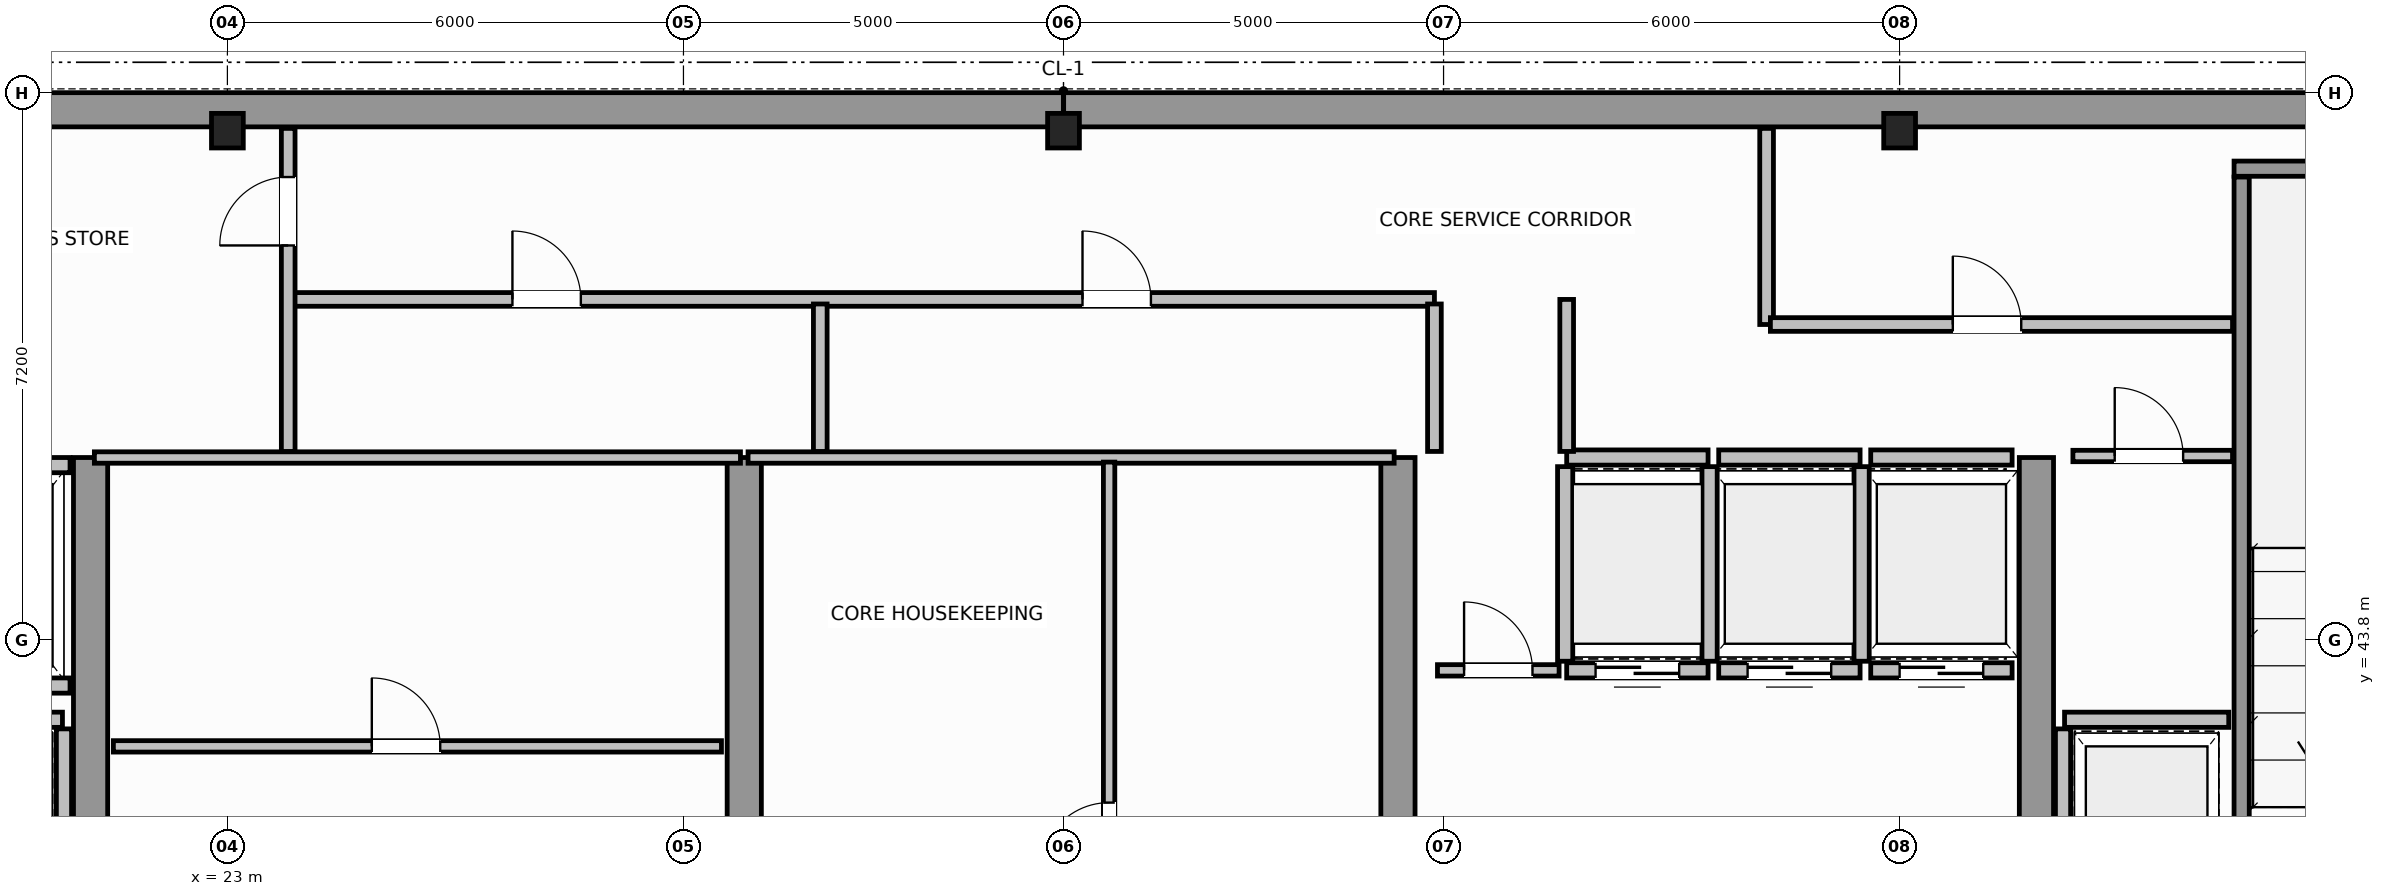
"""IFC4 building model, lengths in metres.
Left out: names, types, materials, properties, quantities, classifications, styles, units other than length and angle.
Written with IfcOpenShell. Run it as: python <this file> out.ifc"""

import sys

from ifc_helpers import new_model, si_unit, direction, frame, frame_2d, origin, origin_2d, place, context, subcontext, project, spatial, rectangle, i_section, extrude, source, transform, mapped, element, fill, save


model = new_model("IFC4")
c1 = context("Model", 3, precision=1e-05, world=origin(), true_north=direction((0.0, 1.0)))
c2 = subcontext(c1, "Body", "Model", "MODEL_VIEW")
j1 = project(units=[si_unit("LENGTHUNIT", "METRE"), si_unit("PLANEANGLEUNIT", "RADIAN")], contexts=[c1])
p1 = place(None, origin())
s1 = spatial("IfcSite", under=j1, at=p1, CompositionType="ELEMENT")
p2 = place(p1, origin())
s2 = spatial("IfcBuilding", under=s1, at=p2, CompositionType="ELEMENT")
p3 = place(p2, frame((0.0, 0.0, 246.0)))
s3 = spatial("IfcBuildingStorey", under=s2, at=p3, CompositionType="ELEMENT", Elevation=246.0)
m1 = source(origin(), c2, "Body", "SweptSolid", [
    extrude(i_section(OverallWidth=0.418, OverallDepth=0.455, WebThickness=0.042, FlangeThickness=0.058, FilletRadius=0.015, at=origin_2d()), origin(), (0.0, 0.0, 1.0), 3.8),
])
for number, where, z_axis, x_axis in (
    (1, (23.0, 50.5, 0.0), (0.0, 0.0, 1.0), (1.0, 0.0, 0.0)),
    (2, (34.0, 50.5, 0.0), (0.0, 0.0, 1.0), (1.0, 0.0, 0.0)),
    (3, (45.0, 50.5, 0.0), (0.0, 0.0, 1.0), (1.0, 0.0, 0.0)),
):
    element("IfcColumn", number, at=place(p3, frame(where, z_axis=z_axis, x_axis=x_axis)), inside=s3, PredefinedType="COLUMN", context=c2, shape_type="MappedRepresentation", body=[
        mapped(m1, transform((0.0, 0.0, 0.0), scale=1.0)),
    ])
for number, where, z_axis, x_axis in (
    (4, (14.229, 50.775, 0.0), (0.0, 0.0, 1.0), (1.0, 0.0, 0.0)),
    (5, (34.002, 50.775, 0.0), (0.0, 0.0, 1.0), (1.0, 0.0, 0.0)),
):
    element("IfcWall", number, at=place(p3, frame(where, z_axis=z_axis, x_axis=x_axis)), inside=s3, PredefinedType="SHEAR", context=c2, shape_type="SweptSolid", body=[
        extrude(rectangle(XDim=19.769, YDim=0.45, at=frame_2d((9.885, 0.0))), origin(), (0.0, 0.0, 1.0), 3.8),
    ])
for number, where, z_axis, x_axis in (
    (6, (21.2, 36.745, 0.0), (0.0, 0.0, 1.0), (0.0, 1.0, 0.0)),
    (7, (29.8, 36.745, 0.0), (0.0, 0.0, 1.0), (0.0, 1.0, 0.0)),
    (8, (38.4, 36.745, 0.0), (0.0, 0.0, 1.0), (0.0, 1.0, 0.0)),
    (9, (46.8, 36.745, 0.0), (0.0, 0.0, 1.0), (0.0, 1.0, 0.0)),
):
    element("IfcWall", number, at=place(p3, frame(where, z_axis=z_axis, x_axis=x_axis)), inside=s3, PredefinedType="SHEAR", context=c2, shape_type="SweptSolid", body=[
        extrude(rectangle(XDim=9.455, YDim=0.45, at=frame_2d((4.728, 0.0))), origin(), (0.0, 0.0, 1.0), 3.8),
    ])
p4 = place(p3, frame((49.4, 50.0, 0.0), z_axis=(0.0, 0.0, 1.0), x_axis=(1.0, 0.0, 0.0)))
e10 = element("IfcWall", 10, at=p4, inside=s3, PredefinedType="SOLIDWALL", context=c2, shape_type="SweptSolid", body=[
    extrude(rectangle(XDim=4.375, YDim=0.2, at=frame_2d((2.188, 0.0))), origin(), (0.0, 0.0, 1.0), 3.8),
])
p5 = place(p3, frame((49.5, 39.96, 0.0), z_axis=(0.0, 0.0, 1.0), x_axis=(0.0, 1.0, 0.0)))
e11 = element("IfcWall", 11, at=p5, inside=s3, PredefinedType="SOLIDWALL", context=c2, shape_type="SweptSolid", body=[
    extrude(rectangle(XDim=9.93, YDim=0.2, at=frame_2d((4.965, 0.0))), origin(), (0.0, 0.0, 1.0), 3.8),
])
p6 = place(p3, frame((40.62, 43.4, 0.0), z_axis=(0.0, 0.0, 1.0), x_axis=(1.0, 0.0, 0.0)))
e12 = element("IfcWall", 12, at=p6, inside=s3, PredefinedType="SOLIDWALL", context=c2, shape_type="SweptSolid", body=[
    extrude(rectangle(XDim=1.86, YDim=0.2, at=frame_2d((0.93, 0.0))), origin(), (0.0, 0.0, 1.0), 3.58),
])
p7 = place(p6, frame((0.38, 0.0, 0.0)))
e13 = element("IfcOpeningElement", 13, at=p7, cuts=e12, PredefinedType="OPENING", context=c2, shape_type="SweptSolid", body=[
    extrude(rectangle(XDim=1.1, YDim=2.15, at=frame_2d((0.55, 1.075))), frame((0.0, 0.11, 0.0), z_axis=(0.0, -1.0, 0.0), x_axis=(1.0, 0.0, 0.0)), (0.0, 0.0, 1.0), 0.22),
])
p8 = place(p3, frame((40.62, 46.2, 0.0), z_axis=(0.0, 0.0, 1.0), x_axis=(1.0, 0.0, 0.0)))
e14 = element("IfcWall", 14, at=p8, inside=s3, PredefinedType="SOLIDWALL", context=c2, shape_type="SweptSolid", body=[
    extrude(rectangle(XDim=1.86, YDim=0.2, at=frame_2d((0.93, 0.0))), origin(), (0.0, 0.0, 1.0), 3.58),
])
for number, where, z_axis, x_axis in (
    (15, (40.6, 43.52, 0.0), (0.0, 0.0, 1.0), (0.0, 1.0, 0.0)),
    (16, (42.5, 43.52, 0.0), (0.0, 0.0, 1.0), (0.0, 1.0, 0.0)),
):
    element("IfcWall", number, at=place(p3, frame(where, z_axis=z_axis, x_axis=x_axis)), inside=s3, PredefinedType="SOLIDWALL", context=c2, shape_type="SweptSolid", body=[
        extrude(rectangle(XDim=2.56, YDim=0.2, at=frame_2d((1.28, 0.0))), origin(), (0.0, 0.0, 1.0), 3.58),
    ])
p9 = place(p3, frame((42.62, 43.4, 0.0), z_axis=(0.0, 0.0, 1.0), x_axis=(1.0, 0.0, 0.0)))
e17 = element("IfcWall", 17, at=p9, inside=s3, PredefinedType="SOLIDWALL", context=c2, shape_type="SweptSolid", body=[
    extrude(rectangle(XDim=1.86, YDim=0.2, at=frame_2d((0.93, 0.0))), origin(), (0.0, 0.0, 1.0), 3.58),
])
p10 = place(p9, frame((0.38, 0.0, 0.0)))
e18 = element("IfcOpeningElement", 18, at=p10, cuts=e17, PredefinedType="OPENING", context=c2, shape_type="SweptSolid", body=[
    extrude(rectangle(XDim=1.1, YDim=2.15, at=frame_2d((0.55, 1.075))), frame((0.0, 0.11, 0.0), z_axis=(0.0, -1.0, 0.0), x_axis=(1.0, 0.0, 0.0)), (0.0, 0.0, 1.0), 0.22),
])
p11 = place(p3, frame((42.62, 46.2, 0.0), z_axis=(0.0, 0.0, 1.0), x_axis=(1.0, 0.0, 0.0)))
e19 = element("IfcWall", 19, at=p11, inside=s3, PredefinedType="SOLIDWALL", context=c2, shape_type="SweptSolid", body=[
    extrude(rectangle(XDim=1.86, YDim=0.2, at=frame_2d((0.93, 0.0))), origin(), (0.0, 0.0, 1.0), 3.58),
])
p12 = place(p3, frame((44.5, 43.52, 0.0), z_axis=(0.0, 0.0, 1.0), x_axis=(0.0, 1.0, 0.0)))
e20 = element("IfcWall", 20, at=p12, inside=s3, PredefinedType="SOLIDWALL", context=c2, shape_type="SweptSolid", body=[
    extrude(rectangle(XDim=2.56, YDim=0.2, at=frame_2d((1.28, 0.0))), origin(), (0.0, 0.0, 1.0), 3.58),
])
p13 = place(p3, frame((44.62, 43.4, 0.0), z_axis=(0.0, 0.0, 1.0), x_axis=(1.0, 0.0, 0.0)))
e21 = element("IfcWall", 21, at=p13, inside=s3, PredefinedType="SOLIDWALL", context=c2, shape_type="SweptSolid", body=[
    extrude(rectangle(XDim=1.86, YDim=0.2, at=frame_2d((0.93, 0.0))), origin(), (0.0, 0.0, 1.0), 3.58),
])
p14 = place(p13, frame((0.38, 0.0, 0.0)))
e22 = element("IfcOpeningElement", 22, at=p14, cuts=e21, PredefinedType="OPENING", context=c2, shape_type="SweptSolid", body=[
    extrude(rectangle(XDim=1.1, YDim=2.15, at=frame_2d((0.55, 1.075))), frame((0.0, 0.11, 0.0), z_axis=(0.0, -1.0, 0.0), x_axis=(1.0, 0.0, 0.0)), (0.0, 0.0, 1.0), 0.22),
])
p15 = place(p3, frame((44.62, 46.2, 0.0), z_axis=(0.0, 0.0, 1.0), x_axis=(1.0, 0.0, 0.0)))
e23 = element("IfcWall", 23, at=p15, inside=s3, PredefinedType="SOLIDWALL", context=c2, shape_type="SweptSolid", body=[
    extrude(rectangle(XDim=1.86, YDim=0.2, at=frame_2d((0.93, 0.0))), origin(), (0.0, 0.0, 1.0), 3.58),
])
p16 = place(p3, frame((18.67, 46.1, 0.0), z_axis=(0.0, 0.0, 1.0), x_axis=(1.0, 0.0, 0.0)))
e24 = element("IfcWall", 24, at=p16, inside=s3, PredefinedType="SOLIDWALL", context=c2, shape_type="SweptSolid", body=[
    extrude(rectangle(XDim=2.26, YDim=0.2, at=frame_2d((1.13, 0.0))), origin(), (0.0, 0.0, 1.0), 3.58),
])
p17 = place(p16, frame((0.58, 0.0, 0.0)))
e25 = element("IfcOpeningElement", 25, at=p17, cuts=e24, PredefinedType="OPENING", context=c2, shape_type="SweptSolid", body=[
    extrude(rectangle(XDim=1.1, YDim=2.15, at=frame_2d((0.55, 1.075))), frame((0.0, 0.11, 0.0), z_axis=(0.0, -1.0, 0.0), x_axis=(1.0, 0.0, 0.0)), (0.0, 0.0, 1.0), 0.22),
])
p18 = place(p3, frame((18.67, 43.2, 0.0), z_axis=(0.0, 0.0, 1.0), x_axis=(1.0, 0.0, 0.0)))
e26 = element("IfcWall", 26, at=p18, inside=s3, PredefinedType="SOLIDWALL", context=c2, shape_type="SweptSolid", body=[
    extrude(rectangle(XDim=2.26, YDim=0.2, at=frame_2d((1.13, 0.0))), origin(), (0.0, 0.0, 1.0), 3.58),
])
p19 = place(p3, frame((18.67, 42.75, 0.0), z_axis=(0.0, 0.0, 1.0), x_axis=(1.0, 0.0, 0.0)))
e27 = element("IfcWall", 27, at=p19, inside=s3, PredefinedType="SOLIDWALL", context=c2, shape_type="SweptSolid", body=[
    extrude(rectangle(XDim=2.16, YDim=0.2, at=frame_2d((1.08, 0.0))), origin(), (0.0, 0.0, 1.0), 3.58),
])
p20 = place(p3, frame((20.85, 40.07, 0.0), z_axis=(0.0, 0.0, 1.0), x_axis=(0.0, 1.0, 0.0)))
e28 = element("IfcWall", 28, at=p20, inside=s3, PredefinedType="SOLIDWALL", context=c2, shape_type="SweptSolid", body=[
    extrude(rectangle(XDim=2.56, YDim=0.2, at=frame_2d((1.28, 0.0))), origin(), (0.0, 0.0, 1.0), 3.58),
])
p21 = place(p3, frame((47.17, 42.75, 0.0), z_axis=(0.0, 0.0, 1.0), x_axis=(1.0, 0.0, 0.0)))
e29 = element("IfcWall", 29, at=p21, inside=s3, PredefinedType="SOLIDWALL", context=c2, shape_type="SweptSolid", body=[
    extrude(rectangle(XDim=2.16, YDim=0.2, at=frame_2d((1.08, 0.0))), origin(), (0.0, 0.0, 1.0), 3.58),
])
p22 = place(p3, frame((47.15, 40.07, 0.0), z_axis=(0.0, 0.0, 1.0), x_axis=(0.0, 1.0, 0.0)))
e30 = element("IfcWall", 30, at=p22, inside=s3, PredefinedType="SOLIDWALL", context=c2, shape_type="SweptSolid", body=[
    extrude(rectangle(XDim=2.56, YDim=0.2, at=frame_2d((1.28, 0.0))), origin(), (0.0, 0.0, 1.0), 3.58),
])
p23 = place(p3, frame((21.25, 46.2, 0.0), z_axis=(0.0, 0.0, 1.0), x_axis=(1.0, 0.0, 0.0)))
e31 = element("IfcWall", 31, at=p23, inside=s3, PredefinedType="PARTITIONING", context=c2, shape_type="SweptSolid", body=[
    extrude(rectangle(XDim=8.5, YDim=0.15, at=frame_2d((4.25, 0.0))), origin(), (0.0, 0.0, 1.0), 3.58),
])
p24 = place(p3, frame((21.5, 42.4, 0.0), z_axis=(0.0, 0.0, 1.0), x_axis=(1.0, 0.0, 0.0)))
e32 = element("IfcWall", 32, at=p24, inside=s3, PredefinedType="PARTITIONING", context=c2, shape_type="SweptSolid", body=[
    extrude(rectangle(XDim=8.0, YDim=0.15, at=frame_2d((4.0, 0.0))), origin(), (0.0, 0.0, 1.0), 3.58),
])
p25 = place(p24, frame((3.4, 0.0, 0.0)))
e33 = element("IfcOpeningElement", 33, at=p25, cuts=e32, PredefinedType="OPENING", context=c2, shape_type="SweptSolid", body=[
    extrude(rectangle(XDim=0.9, YDim=2.1, at=frame_2d((0.45, 1.05))), frame((0.0, 0.085, 0.0), z_axis=(0.0, -1.0, 0.0), x_axis=(1.0, 0.0, 0.0)), (0.0, 0.0, 1.0), 0.17),
])
p26 = place(p3, frame((29.85, 46.2, 0.0), z_axis=(0.0, 0.0, 1.0), x_axis=(1.0, 0.0, 0.0)))
e34 = element("IfcWall", 34, at=p26, inside=s3, PredefinedType="PARTITIONING", context=c2, shape_type="SweptSolid", body=[
    extrude(rectangle(XDim=8.5, YDim=0.15, at=frame_2d((4.25, 0.0))), origin(), (0.0, 0.0, 1.0), 3.58),
])
p27 = place(p3, frame((34.6, 36.56, 0.0), z_axis=(0.0, 0.0, 1.0), x_axis=(0.0, 1.0, 0.0)))
e35 = element("IfcWall", 35, at=p27, inside=s3, PredefinedType="PARTITIONING", context=c2, shape_type="SweptSolid", body=[
    extrude(rectangle(XDim=9.58, YDim=0.15, at=frame_2d((4.79, 0.0))), origin(), (0.0, 0.0, 1.0), 3.58),
])
p28 = place(p27, frame((4.2, 0.0, 0.0)))
e36 = element("IfcOpeningElement", 36, at=p28, cuts=e35, PredefinedType="OPENING", context=c2, shape_type="SweptSolid", body=[
    extrude(rectangle(XDim=0.9, YDim=2.1, at=frame_2d((0.45, 1.05))), frame((0.0, 0.085, 0.0), z_axis=(0.0, -1.0, 0.0), x_axis=(1.0, 0.0, 0.0)), (0.0, 0.0, 1.0), 0.17),
])
p29 = place(p3, frame((47.28, 46.22, 0.0), z_axis=(0.0, 0.0, 1.0), x_axis=(1.0, 0.0, 0.0)))
e37 = element("IfcWall", 37, at=p29, inside=s3, PredefinedType="PARTITIONING", context=c2, shape_type="SweptSolid", body=[
    extrude(rectangle(XDim=2.1, YDim=0.15, at=frame_2d((1.05, 0.0))), origin(), (0.0, 0.0, 1.0), 3.58),
])
p30 = place(p29, frame((0.55, 0.0, 0.0)))
e38 = element("IfcOpeningElement", 38, at=p30, cuts=e37, PredefinedType="OPENING", context=c2, shape_type="SweptSolid", body=[
    extrude(rectangle(XDim=0.9, YDim=2.1, at=frame_2d((0.45, 1.05))), frame((0.0, 0.085, 0.0), z_axis=(0.0, -1.0, 0.0), x_axis=(1.0, 0.0, 0.0)), (0.0, 0.0, 1.0), 0.17),
])
p31 = place(p3, frame((38.92, 43.4, 0.0), z_axis=(0.0, 0.0, 1.0), x_axis=(1.0, 0.0, 0.0)))
e39 = element("IfcWall", 39, at=p31, inside=s3, PredefinedType="PARTITIONING", context=c2, shape_type="SweptSolid", body=[
    extrude(rectangle(XDim=1.6, YDim=0.15, at=frame_2d((0.8, 0.0))), origin(), (0.0, 0.0, 1.0), 3.58),
])
p32 = place(p31, frame((0.35, 0.0, 0.0)))
e40 = element("IfcOpeningElement", 40, at=p32, cuts=e39, PredefinedType="OPENING", context=c2, shape_type="SweptSolid", body=[
    extrude(rectangle(XDim=0.9, YDim=2.1, at=frame_2d((0.45, 1.05))), frame((0.0, 0.085, 0.0), z_axis=(0.0, -1.0, 0.0), x_axis=(1.0, 0.0, 0.0)), (0.0, 0.0, 1.0), 0.17),
])
p33 = place(p3, frame((23.85, 48.28, 0.0), z_axis=(0.0, 0.0, 1.0), x_axis=(1.0, 0.0, 0.0)))
e41 = element("IfcWall", 41, at=p33, inside=s3, PredefinedType="PLUMBINGWALL", context=c2, shape_type="SweptSolid", body=[
    extrude(rectangle(XDim=15.03, YDim=0.18, at=frame_2d((7.515, 0.0))), origin(), (0.0, 0.0, 1.0), 3.58),
])
p34 = place(p33, frame((2.9, 0.0, 0.0)))
e42 = element("IfcOpeningElement", 42, at=p34, cuts=e41, PredefinedType="OPENING", context=c2, shape_type="SweptSolid", body=[
    extrude(rectangle(XDim=0.9, YDim=2.15, at=frame_2d((0.45, 1.075))), frame((0.0, 0.1, 0.0), z_axis=(0.0, -1.0, 0.0), x_axis=(1.0, 0.0, 0.0)), (0.0, 0.0, 1.0), 0.2),
])
p35 = place(p33, frame((10.4, 0.0, 0.0)))
e43 = element("IfcOpeningElement", 43, at=p35, cuts=e41, PredefinedType="OPENING", context=c2, shape_type="SweptSolid", body=[
    extrude(rectangle(XDim=0.9, YDim=2.15, at=frame_2d((0.45, 1.075))), frame((0.0, 0.1, 0.0), z_axis=(0.0, -1.0, 0.0), x_axis=(1.0, 0.0, 0.0)), (0.0, 0.0, 1.0), 0.2),
])
p36 = place(p3, frame((23.8, 46.28, 0.0), z_axis=(0.0, 0.0, 1.0), x_axis=(0.0, 1.0, 0.0)))
e44 = element("IfcWall", 44, at=p36, inside=s3, PredefinedType="PLUMBINGWALL", context=c2, shape_type="SweptSolid", body=[
    extrude(rectangle(XDim=4.25, YDim=0.18, at=frame_2d((2.125, 0.0))), origin(), (0.0, 0.0, 1.0), 3.58),
])
p37 = place(p36, frame((2.71, 0.0, 0.0)))
e45 = element("IfcOpeningElement", 45, at=p37, cuts=e44, PredefinedType="OPENING", context=c2, shape_type="SweptSolid", body=[
    extrude(rectangle(XDim=0.9, YDim=2.15, at=frame_2d((0.45, 1.075))), frame((0.0, 0.1, 0.0), z_axis=(0.0, -1.0, 0.0), x_axis=(1.0, 0.0, 0.0)), (0.0, 0.0, 1.0), 0.2),
])
for number, where, z_axis, x_axis in (
    (46, (30.8, 46.28, 0.0), (0.0, 0.0, 1.0), (0.0, 1.0, 0.0)),
    (47, (38.88, 46.28, 0.0), (0.0, 0.0, 1.0), (0.0, 1.0, 0.0)),
):
    element("IfcWall", number, at=place(p3, frame(where, z_axis=z_axis, x_axis=x_axis)), inside=s3, PredefinedType="PLUMBINGWALL", context=c2, shape_type="SweptSolid", body=[
        extrude(rectangle(XDim=1.94, YDim=0.18, at=frame_2d((0.97, 0.0))), origin(), (0.0, 0.0, 1.0), 3.58),
    ])
p38 = place(p3, frame((40.62, 46.28, 0.0), z_axis=(0.0, 0.0, 1.0), x_axis=(0.0, 1.0, 0.0)))
e48 = element("IfcWall", 48, at=p38, inside=s3, PredefinedType="PLUMBINGWALL", context=c2, shape_type="SweptSolid", body=[
    extrude(rectangle(XDim=2.0, YDim=0.18, at=frame_2d((1.0, 0.0))), origin(), (0.0, 0.0, 1.0), 3.58),
])
p39 = place(p3, frame((43.25, 47.95, 0.0), z_axis=(0.0, 0.0, 1.0), x_axis=(0.0, 1.0, 0.0)))
e49 = element("IfcWall", 49, at=p39, inside=s3, PredefinedType="PLUMBINGWALL", context=c2, shape_type="SweptSolid", body=[
    extrude(rectangle(XDim=2.58, YDim=0.18, at=frame_2d((1.29, 0.0))), origin(), (0.0, 0.0, 1.0), 3.58),
])
p40 = place(p3, frame((43.3, 47.95, 0.0), z_axis=(0.0, 0.0, 1.0), x_axis=(1.0, 0.0, 0.0)))
e50 = element("IfcWall", 50, at=p40, inside=s3, PredefinedType="PLUMBINGWALL", context=c2, shape_type="SweptSolid", body=[
    extrude(rectangle(XDim=6.08, YDim=0.18, at=frame_2d((3.04, 0.0))), origin(), (0.0, 0.0, 1.0), 3.58),
])
p41 = place(p40, frame((2.4, 0.0, 0.0)))
e51 = element("IfcOpeningElement", 51, at=p41, cuts=e50, PredefinedType="OPENING", context=c2, shape_type="SweptSolid", body=[
    extrude(rectangle(XDim=0.9, YDim=2.15, at=frame_2d((0.45, 1.075))), frame((0.0, 0.1, 0.0), z_axis=(0.0, -1.0, 0.0), x_axis=(1.0, 0.0, 0.0)), (0.0, 0.0, 1.0), 0.2),
])
m2 = source(origin(), c2, "Body", "SweptSolid", [
    extrude(rectangle(XDim=1.1, YDim=2.15, at=frame_2d((0.55, 1.075))), frame((0.0, 0.025, 0.0), z_axis=(0.0, -1.0, 0.0), x_axis=(1.0, 0.0, 0.0)), (0.0, 0.0, 1.0), 0.05),
])
p42 = place(p7, origin())
e52 = element("IfcDoor", 52, at=p42, inside=s3, OperationType="DOUBLE_DOOR_SLIDING", PredefinedType="DOOR", context=c2, shape_type="MappedRepresentation", body=[
    mapped(m2, transform((0.0, 0.0, 0.0), scale=1.0)),
])
fill(e13, e52)
p43 = place(p10, origin())
e53 = element("IfcDoor", 53, at=p43, inside=s3, OperationType="DOUBLE_DOOR_SLIDING", PredefinedType="DOOR", context=c2, shape_type="MappedRepresentation", body=[
    mapped(m2, transform((0.0, 0.0, 0.0), scale=1.0)),
])
fill(e18, e53)
p44 = place(p14, origin())
e54 = element("IfcDoor", 54, at=p44, inside=s3, OperationType="DOUBLE_DOOR_SLIDING", PredefinedType="DOOR", context=c2, shape_type="MappedRepresentation", body=[
    mapped(m2, transform((0.0, 0.0, 0.0), scale=1.0)),
])
fill(e22, e54)
m3 = source(origin(), c2, "Body", "SweptSolid", [
    extrude(rectangle(XDim=0.9, YDim=2.1, at=frame_2d((0.45, 1.05))), frame((0.0, 0.025, 0.0), z_axis=(0.0, -1.0, 0.0), x_axis=(1.0, 0.0, 0.0)), (0.0, 0.0, 1.0), 0.05),
])
p45 = place(p25, origin())
e55 = element("IfcDoor", 55, at=p45, inside=s3, OperationType="SINGLE_SWING_RIGHT", PredefinedType="DOOR", context=c2, shape_type="MappedRepresentation", body=[
    mapped(m3, transform((0.0, 0.0, 0.0), scale=1.0)),
])
fill(e33, e55)
p46 = place(p28, origin())
e56 = element("IfcDoor", 56, at=p46, inside=s3, OperationType="SINGLE_SWING_RIGHT", PredefinedType="DOOR", context=c2, shape_type="MappedRepresentation", body=[
    mapped(m3, transform((0.0, 0.0, 0.0), scale=1.0)),
])
fill(e36, e56)
p47 = place(p30, origin())
e57 = element("IfcDoor", 57, at=p47, inside=s3, OperationType="SINGLE_SWING_RIGHT", PredefinedType="DOOR", context=c2, shape_type="MappedRepresentation", body=[
    mapped(m3, transform((0.0, 0.0, 0.0), scale=1.0)),
])
fill(e38, e57)
p48 = place(p32, origin())
e58 = element("IfcDoor", 58, at=p48, inside=s3, OperationType="SINGLE_SWING_LEFT", PredefinedType="DOOR", context=c2, shape_type="MappedRepresentation", body=[
    mapped(m3, transform((0.0, 0.0, 0.0), scale=1.0)),
])
fill(e40, e58)
m4 = source(origin(), c2, "Body", "SweptSolid", [
    extrude(rectangle(XDim=0.9, YDim=2.15, at=frame_2d((0.45, 1.075))), frame((0.0, 0.025, 0.0), z_axis=(0.0, -1.0, 0.0), x_axis=(1.0, 0.0, 0.0)), (0.0, 0.0, 1.0), 0.05),
])
p49 = place(p37, origin())
e59 = element("IfcDoor", 59, at=p49, inside=s3, OperationType="SINGLE_SWING_LEFT", PredefinedType="DOOR", context=c2, shape_type="MappedRepresentation", body=[
    mapped(m4, transform((0.0, 0.0, 0.0), scale=1.0)),
])
fill(e45, e59)
p50 = place(p34, origin())
e60 = element("IfcDoor", 60, at=p50, inside=s3, OperationType="SINGLE_SWING_RIGHT", PredefinedType="DOOR", context=c2, shape_type="MappedRepresentation", body=[
    mapped(m4, transform((0.0, 0.0, 0.0), scale=1.0)),
])
fill(e42, e60)
p51 = place(p35, origin())
e61 = element("IfcDoor", 61, at=p51, inside=s3, OperationType="SINGLE_SWING_LEFT", PredefinedType="DOOR", context=c2, shape_type="MappedRepresentation", body=[
    mapped(m4, transform((0.0, 0.0, 0.0), scale=1.0)),
])
fill(e43, e61)
p52 = place(p41, origin())
e62 = element("IfcDoor", 62, at=p52, inside=s3, OperationType="SINGLE_SWING_RIGHT", PredefinedType="DOOR", context=c2, shape_type="MappedRepresentation", body=[
    mapped(m4, transform((0.0, 0.0, 0.0), scale=1.0)),
])
fill(e51, e62)
save(model, sys.argv[1])
